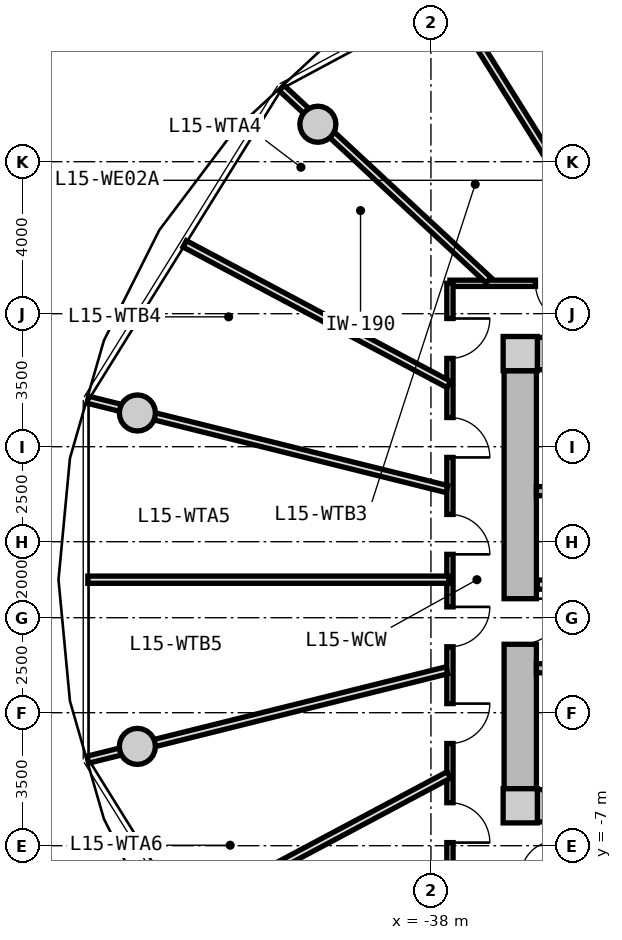
"""IFC4 building model, lengths in metres.
Left out: names, types, materials, properties, quantities, classifications, styles, units other than length and angle.
Written with IfcOpenShell. Run it as: python <this file> out.ifc"""

import sys

from ifc_helpers import new_model, si_unit, direction, frame, frame_2d, origin, origin_2d, place, context, subcontext, project, spatial, rectangle, circle, extrude, source, transform, mapped, element, fill, save


model = new_model("IFC4")
c1 = context("Model", 3, precision=1e-05, world=origin(), true_north=direction((0.0, 1.0)))
c2 = subcontext(c1, "Body", "Model", "MODEL_VIEW")
j1 = project(units=[si_unit("LENGTHUNIT", "METRE"), si_unit("PLANEANGLEUNIT", "RADIAN")], contexts=[c1])
p1 = place(None, origin())
s1 = spatial("IfcSite", under=j1, at=p1, CompositionType="ELEMENT")
p2 = place(p1, origin())
s2 = spatial("IfcBuilding", under=s1, at=p2, CompositionType="ELEMENT")
p3 = place(p2, frame((0.0, 0.0, 52.1)))
s3 = spatial("IfcBuildingStorey", under=s2, at=p3, CompositionType="ELEMENT", Elevation=52.1)
m1 = source(origin(), c2, "Body", "SweptSolid", [
    extrude(rectangle(XDim=0.9, YDim=0.9, at=origin_2d()), origin(), (0.0, 0.0, 1.0), 3.05),
])
for number, where, z_axis, x_axis in (
    (1, (-35.65, -5.95, 0.0), (0.0, 0.0, 1.0), (1.0, 0.0, 0.0)),
    (2, (-35.65, 5.95, 0.0), (0.0, 0.0, 1.0), (1.0, 0.0, 0.0)),
):
    element("IfcColumn", number, at=place(p3, frame(where, z_axis=z_axis, x_axis=x_axis)), inside=s3, PredefinedType="COLUMN", context=c2, shape_type="MappedRepresentation", body=[
        mapped(m1, transform((0.0, 0.0, 0.0), x_axis=(1.0, 0.0, 0.0), y_axis=(0.0, 1.0, 0.0), z_axis=(0.0, 0.0, 1.0), scale=1.0)),
    ])
m2 = source(origin(), c2, "Body", "SweptSolid", [
    extrude(rectangle(XDim=14.4, YDim=0.85, at=frame_2d((7.2, 0.0))), origin(), (0.0, 0.0, 1.0), 2.79),
])
for number, where, z_axis, x_axis in (
    (3, (-35.2, 5.95, 0.0), (0.0, 0.0, 1.0), (1.0, 0.0, 0.0)),
    (4, (-20.8, -5.95, 0.0), (0.0, 0.0, 1.0), (-1.0, 0.0, 0.0)),
):
    element("IfcWall", number, at=place(p3, frame(where, z_axis=z_axis, x_axis=x_axis)), inside=s3, PredefinedType="SHEAR", context=c2, shape_type="MappedRepresentation", body=[
        mapped(m2, transform((0.0, 0.0, 0.0), x_axis=(1.0, 0.0, 0.0), y_axis=(0.0, 1.0, 0.0), z_axis=(0.0, 0.0, 1.0), scale=1.0)),
    ])
m3 = source(origin(), c2, "Body", "SweptSolid", [
    extrude(rectangle(XDim=11.0, YDim=0.85, at=frame_2d((5.5, 0.0))), origin(), (0.0, 0.0, 1.0), 2.79),
])
p4 = place(p3, frame((-35.65, -5.5, 0.0), z_axis=(0.0, 0.0, 1.0), x_axis=(0.0, 1.0, 0.0)))
e5 = element("IfcWall", 5, at=p4, inside=s3, PredefinedType="SHEAR", context=c2, shape_type="MappedRepresentation", body=[
    mapped(m3, transform((0.0, 0.0, 0.0), x_axis=(1.0, 0.0, 0.0), y_axis=(0.0, 1.0, 0.0), z_axis=(0.0, 0.0, 1.0), scale=1.0)),
])
p5 = place(p4, frame((3.8, 0.0, 0.0)))
e6 = element("IfcOpeningElement", 6, at=p5, cuts=e5, PredefinedType="OPENING", context=c2, shape_type="SweptSolid", body=[
    extrude(rectangle(XDim=1.2, YDim=2.15, at=frame_2d((0.6, 1.075))), frame((0.0, 0.435, 0.0), z_axis=(0.0, -1.0, 0.0), x_axis=(1.0, 0.0, 0.0)), (0.0, 0.0, 1.0), 0.87),
])
m4 = source(origin(), c2, "Body", "SweptSolid", [
    extrude(circle(Radius=0.475, at=origin_2d()), origin(), (0.0, 0.0, 1.0), 3.05),
])
for number, where, z_axis, x_axis in (
    (7, (-40.975, 11.985, 0.0), (0.0, 0.0, 1.0), (1.0, 0.0, 0.0)),
    (8, (-45.725, 4.387, 0.0), (0.0, 0.0, 1.0), (1.0, 0.0, 0.0)),
    (9, (-45.725, -4.387, 0.0), (0.0, 0.0, 1.0), (1.0, 0.0, 0.0)),
):
    element("IfcColumn", number, at=place(p3, frame(where, z_axis=z_axis, x_axis=x_axis)), inside=s3, PredefinedType="COLUMN", context=c2, shape_type="MappedRepresentation", body=[
        mapped(m4, transform((0.0, 0.0, 0.0), x_axis=(1.0, 0.0, 0.0), y_axis=(0.0, 1.0, 0.0), z_axis=(0.0, 0.0, 1.0), scale=1.0)),
    ])
m5 = source(origin(), c2, "Body", "SweptSolid", [
    extrude(rectangle(XDim=7.765, YDim=0.24, at=frame_2d((3.883, 0.0))), origin(), (0.0, 0.0, 1.0), 2.79),
])
p6 = place(p3, frame((-35.225, 2.33, 0.0), z_axis=(0.0, 0.0, 1.0), x_axis=(1.0, 0.0, 0.0)))
e10 = element("IfcWall", 10, at=p6, inside=s3, PredefinedType="PARTITIONING", context=c2, shape_type="MappedRepresentation", body=[
    mapped(m5, transform((0.0, 0.0, 0.0), x_axis=(1.0, 0.0, 0.0), y_axis=(0.0, 1.0, 0.0), z_axis=(0.0, 0.0, 1.0), scale=1.0)),
])
p7 = place(p3, frame((-35.225, -2.33, 0.0), z_axis=(0.0, 0.0, 1.0), x_axis=(1.0, 0.0, 0.0)))
e11 = element("IfcWall", 11, at=p7, inside=s3, PredefinedType="PARTITIONING", context=c2, shape_type="MappedRepresentation", body=[
    mapped(m5, transform((0.0, 0.0, 0.0), x_axis=(1.0, 0.0, 0.0), y_axis=(0.0, 1.0, 0.0), z_axis=(0.0, 0.0, 1.0), scale=1.0)),
])
p8 = place(p7, frame((0.885, 0.0, 0.0)))
e12 = element("IfcOpeningElement", 12, at=p8, cuts=e11, PredefinedType="OPENING", context=c2, shape_type="SweptSolid", body=[
    extrude(rectangle(XDim=1.1, YDim=2.15, at=frame_2d((0.55, 1.075))), frame((0.0, 0.13, 0.0), z_axis=(0.0, -1.0, 0.0), x_axis=(1.0, 0.0, 0.0)), (0.0, 0.0, 1.0), 0.26),
])
m6 = source(origin(), c2, "Body", "SweptSolid", [
    extrude(rectangle(XDim=7.62, YDim=0.24, at=frame_2d((3.81, 0.0))), origin(), (0.0, 0.0, 1.0), 2.775),
])
p9 = place(p3, frame((-35.2, -0.13, 0.0), z_axis=(0.0, 0.0, 1.0), x_axis=(1.0, 0.0, 0.0)))
e13 = element("IfcWall", 13, at=p9, inside=s3, PredefinedType="PARTITIONING", context=c2, shape_type="MappedRepresentation", body=[
    mapped(m6, transform((0.0, 0.0, 0.0), x_axis=(1.0, 0.0, 0.0), y_axis=(0.0, 1.0, 0.0), z_axis=(0.0, 0.0, 1.0), scale=1.0)),
])
p10 = place(p9, frame((6.22, 0.0, 0.0)))
e14 = element("IfcOpeningElement", 14, at=p10, cuts=e13, PredefinedType="OPENING", context=c2, shape_type="SweptSolid", body=[
    extrude(rectangle(XDim=1.0, YDim=2.1, at=frame_2d((0.5, 1.05))), frame((0.0, 0.13, 0.0), z_axis=(0.0, -1.0, 0.0), x_axis=(1.0, 0.0, 0.0)), (0.0, 0.0, 1.0), 0.26),
])
p11 = place(p9, frame((0.85, 0.0, 0.0)))
e15 = element("IfcOpeningElement", 15, at=p11, cuts=e13, PredefinedType="OPENING", context=c2, shape_type="SweptSolid", body=[
    extrude(rectangle(XDim=1.1, YDim=2.2, at=frame_2d((0.55, 1.1))), frame((0.0, 0.13, 0.0), z_axis=(0.0, -1.0, 0.0), x_axis=(1.0, 0.0, 0.0)), (0.0, 0.0, 1.0), 0.26),
])
p12 = place(p9, frame((3.85, 0.0, 0.0)))
e16 = element("IfcOpeningElement", 16, at=p12, cuts=e13, PredefinedType="OPENING", context=c2, shape_type="SweptSolid", body=[
    extrude(rectangle(XDim=1.1, YDim=2.2, at=frame_2d((0.55, 1.1))), frame((0.0, 0.13, 0.0), z_axis=(0.0, -1.0, 0.0), x_axis=(1.0, 0.0, 0.0)), (0.0, 0.0, 1.0), 0.26),
])
m7 = source(origin(), c2, "Body", "SweptSolid", [
    extrude(rectangle(XDim=19.0, YDim=0.165, at=frame_2d((9.5, 0.0))), origin(), (0.0, 0.0, 1.0), 2.775),
])
p13 = place(p3, frame((-37.5, 7.8, 0.0), z_axis=(0.0, 0.0, 1.0), x_axis=(1.0, 0.0, 0.0)))
e17 = element("IfcWall", 17, at=p13, inside=s3, PredefinedType="PARTITIONING", context=c2, shape_type="MappedRepresentation", body=[
    mapped(m7, transform((0.0, 0.0, 0.0), x_axis=(1.0, 0.0, 0.0), y_axis=(0.0, 1.0, 0.0), z_axis=(0.0, 0.0, 1.0), scale=1.0)),
])
p14 = place(p13, frame((14.653, 0.0, 0.0)))
e18 = element("IfcOpeningElement", 18, at=p14, cuts=e17, PredefinedType="OPENING", context=c2, shape_type="SweptSolid", body=[
    extrude(rectangle(XDim=1.05, YDim=2.15, at=frame_2d((0.525, 1.075))), frame((0.0, 0.093, 0.0), z_axis=(0.0, -1.0, 0.0), x_axis=(1.0, 0.0, 0.0)), (0.0, 0.0, 1.0), 0.185),
])
p15 = place(p13, frame((12.5, 0.0, 0.0)))
e19 = element("IfcOpeningElement", 19, at=p15, cuts=e17, PredefinedType="OPENING", context=c2, shape_type="SweptSolid", body=[
    extrude(rectangle(XDim=1.05, YDim=2.15, at=frame_2d((0.525, 1.075))), frame((0.0, 0.093, 0.0), z_axis=(0.0, -1.0, 0.0), x_axis=(1.0, 0.0, 0.0)), (0.0, 0.0, 1.0), 0.185),
])
p16 = place(p13, frame((9.352, 0.0, 0.0)))
e20 = element("IfcOpeningElement", 20, at=p16, cuts=e17, PredefinedType="OPENING", context=c2, shape_type="SweptSolid", body=[
    extrude(rectangle(XDim=1.05, YDim=2.15, at=frame_2d((0.525, 1.075))), frame((0.0, 0.093, 0.0), z_axis=(0.0, -1.0, 0.0), x_axis=(1.0, 0.0, 0.0)), (0.0, 0.0, 1.0), 0.185),
])
p17 = place(p13, frame((7.806, 0.0, 0.0)))
e21 = element("IfcOpeningElement", 21, at=p17, cuts=e17, PredefinedType="OPENING", context=c2, shape_type="SweptSolid", body=[
    extrude(rectangle(XDim=1.05, YDim=2.15, at=frame_2d((0.525, 1.075))), frame((0.0, 0.093, 0.0), z_axis=(0.0, -1.0, 0.0), x_axis=(1.0, 0.0, 0.0)), (0.0, 0.0, 1.0), 0.185),
])
p18 = place(p13, frame((5.396, 0.0, 0.0)))
e22 = element("IfcOpeningElement", 22, at=p18, cuts=e17, PredefinedType="OPENING", context=c2, shape_type="SweptSolid", body=[
    extrude(rectangle(XDim=1.05, YDim=2.15, at=frame_2d((0.525, 1.075))), frame((0.0, 0.093, 0.0), z_axis=(0.0, -1.0, 0.0), x_axis=(1.0, 0.0, 0.0)), (0.0, 0.0, 1.0), 0.185),
])
p19 = place(p13, frame((2.251, 0.0, 0.0)))
e23 = element("IfcOpeningElement", 23, at=p19, cuts=e17, PredefinedType="OPENING", context=c2, shape_type="SweptSolid", body=[
    extrude(rectangle(XDim=1.05, YDim=2.15, at=frame_2d((0.525, 1.075))), frame((0.0, 0.093, 0.0), z_axis=(0.0, -1.0, 0.0), x_axis=(1.0, 0.0, 0.0)), (0.0, 0.0, 1.0), 0.185),
])
m8 = source(origin(), c2, "Body", "SweptSolid", [
    extrude(rectangle(XDim=15.6, YDim=0.165, at=frame_2d((7.8, 0.0))), origin(), (0.0, 0.0, 1.0), 2.775),
])
p20 = place(p3, frame((-37.5, -7.8, 0.0), z_axis=(0.0, 0.0, 1.0), x_axis=(0.0, 1.0, 0.0)))
e24 = element("IfcWall", 24, at=p20, inside=s3, PredefinedType="PARTITIONING", context=c2, shape_type="MappedRepresentation", body=[
    mapped(m8, transform((0.0, 0.0, 0.0), x_axis=(1.0, 0.0, 0.0), y_axis=(0.0, 1.0, 0.0), z_axis=(0.0, 0.0, 1.0), scale=1.0)),
])
p21 = place(p20, frame((13.623, 0.0, 0.0)))
e25 = element("IfcOpeningElement", 25, at=p21, cuts=e24, PredefinedType="OPENING", context=c2, shape_type="SweptSolid", body=[
    extrude(rectangle(XDim=1.05, YDim=2.15, at=frame_2d((0.525, 1.075))), frame((0.0, 0.093, 0.0), z_axis=(0.0, -1.0, 0.0), x_axis=(1.0, 0.0, 0.0)), (0.0, 0.0, 1.0), 0.185),
])
p22 = place(p20, frame((11.018, 0.0, 0.0)))
e26 = element("IfcOpeningElement", 26, at=p22, cuts=e24, PredefinedType="OPENING", context=c2, shape_type="SweptSolid", body=[
    extrude(rectangle(XDim=1.05, YDim=2.15, at=frame_2d((0.525, 1.075))), frame((0.0, 0.093, 0.0), z_axis=(0.0, -1.0, 0.0), x_axis=(1.0, 0.0, 0.0)), (0.0, 0.0, 1.0), 0.185),
])
p23 = place(p20, frame((8.467, 0.0, 0.0)))
e27 = element("IfcOpeningElement", 27, at=p23, cuts=e24, PredefinedType="OPENING", context=c2, shape_type="SweptSolid", body=[
    extrude(rectangle(XDim=1.05, YDim=2.15, at=frame_2d((0.525, 1.075))), frame((0.0, 0.093, 0.0), z_axis=(0.0, -1.0, 0.0), x_axis=(1.0, 0.0, 0.0)), (0.0, 0.0, 1.0), 0.185),
])
p24 = place(p20, frame((6.035, 0.0, 0.0)))
e28 = element("IfcOpeningElement", 28, at=p24, cuts=e24, PredefinedType="OPENING", context=c2, shape_type="SweptSolid", body=[
    extrude(rectangle(XDim=1.05, YDim=2.15, at=frame_2d((0.525, 1.075))), frame((0.0, 0.093, 0.0), z_axis=(0.0, -1.0, 0.0), x_axis=(1.0, 0.0, 0.0)), (0.0, 0.0, 1.0), 0.185),
])
p25 = place(p20, frame((3.489, 0.0, 0.0)))
e29 = element("IfcOpeningElement", 29, at=p25, cuts=e24, PredefinedType="OPENING", context=c2, shape_type="SweptSolid", body=[
    extrude(rectangle(XDim=1.05, YDim=2.15, at=frame_2d((0.525, 1.075))), frame((0.0, 0.093, 0.0), z_axis=(0.0, -1.0, 0.0), x_axis=(1.0, 0.0, 0.0)), (0.0, 0.0, 1.0), 0.185),
])
p26 = place(p20, frame((0.882, 0.0, 0.0)))
e30 = element("IfcOpeningElement", 30, at=p26, cuts=e24, PredefinedType="OPENING", context=c2, shape_type="SweptSolid", body=[
    extrude(rectangle(XDim=1.05, YDim=2.15, at=frame_2d((0.525, 1.075))), frame((0.0, 0.093, 0.0), z_axis=(0.0, -1.0, 0.0), x_axis=(1.0, 0.0, 0.0)), (0.0, 0.0, 1.0), 0.185),
])
m9 = source(origin(), c2, "Body", "SweptSolid", [
    extrude(rectangle(XDim=7.435, YDim=0.19, at=frame_2d((3.717, 0.0))), origin(), (0.0, 0.0, 1.0), 2.225),
])
p27 = place(p3, frame((-36.483, 7.88, 0.0), z_axis=(0.0, 0.0, 1.0), x_axis=(-0.732651956848, 0.680603489652, 0.0)))
e31 = element("IfcWall", 31, at=p27, inside=s3, PredefinedType="PARTITIONING", context=c2, shape_type="MappedRepresentation", body=[
    mapped(m9, transform((0.0, 0.0, 0.0), x_axis=(1.0, 0.0, 0.0), y_axis=(0.0, 1.0, 0.0), z_axis=(0.0, 0.0, 1.0), scale=1.0)),
])
m10 = source(origin(), c2, "Body", "SweptSolid", [
    extrude(rectangle(XDim=9.737, YDim=0.19, at=frame_2d((4.869, 0.0))), origin(), (0.0, 0.0, 1.0), 2.225),
])
p28 = place(p3, frame((-37.58, 2.385, 0.0), z_axis=(0.0, 0.0, 1.0), x_axis=(-0.970392716238, 0.241532557375, 0.0)))
e32 = element("IfcWall", 32, at=p28, inside=s3, PredefinedType="PARTITIONING", context=c2, shape_type="MappedRepresentation", body=[
    mapped(m10, transform((0.0, 0.0, 0.0), x_axis=(1.0, 0.0, 0.0), y_axis=(0.0, 1.0, 0.0), z_axis=(0.0, 0.0, 1.0), scale=1.0)),
])
m11 = source(origin(), c2, "Body", "SweptSolid", [
    extrude(rectangle(XDim=7.873, YDim=0.19, at=frame_2d((3.937, 0.0))), origin(), (0.0, 0.0, 1.0), 2.775),
])
p29 = place(p3, frame((-37.53, 5.138, 0.0), z_axis=(0.0, 0.0, 1.0), x_axis=(-0.882666052726, 0.470000680175, 0.0)))
e33 = element("IfcWall", 33, at=p29, inside=s3, PredefinedType="PARTITIONING", context=c2, shape_type="MappedRepresentation", body=[
    mapped(m11, transform((0.0, 0.0, 0.0), x_axis=(1.0, 0.0, 0.0), y_axis=(0.0, 1.0, 0.0), z_axis=(0.0, 0.0, 1.0), scale=1.0)),
])
p30 = place(p3, frame((-37.58, -2.385, 0.0), z_axis=(0.0, 0.0, 1.0), x_axis=(-0.970392716238, -0.241532557375, 0.0)))
e34 = element("IfcWall", 34, at=p30, inside=s3, PredefinedType="PARTITIONING", context=c2, shape_type="MappedRepresentation", body=[
    mapped(m10, transform((0.0, 0.0, 0.0), x_axis=(1.0, 0.0, 0.0), y_axis=(0.0, 1.0, 0.0), z_axis=(0.0, 0.0, 1.0), scale=1.0)),
])
m12 = source(origin(), c2, "Body", "SweptSolid", [
    extrude(rectangle(XDim=9.499, YDim=0.19, at=frame_2d((4.75, 0.0))), origin(), (0.0, 0.0, 1.0), 2.775),
])
p31 = place(p3, frame((-37.53, 0.0, 0.0), z_axis=(0.0, 0.0, 1.0), x_axis=(-1.0, 0.0, 0.0)))
e35 = element("IfcWall", 35, at=p31, inside=s3, PredefinedType="PARTITIONING", context=c2, shape_type="MappedRepresentation", body=[
    mapped(m12, transform((0.0, 0.0, 0.0), x_axis=(1.0, 0.0, 0.0), y_axis=(0.0, 1.0, 0.0), z_axis=(0.0, 0.0, 1.0), scale=1.0)),
])
p32 = place(p3, frame((-37.53, -5.138, 0.0), z_axis=(0.0, 0.0, 1.0), x_axis=(-0.882666052726, -0.470000680175, 0.0)))
e36 = element("IfcWall", 36, at=p32, inside=s3, PredefinedType="PARTITIONING", context=c2, shape_type="MappedRepresentation", body=[
    mapped(m11, transform((0.0, 0.0, 0.0), x_axis=(1.0, 0.0, 0.0), y_axis=(0.0, 1.0, 0.0), z_axis=(0.0, 0.0, 1.0), scale=1.0)),
])
m13 = source(origin(), c2, "Body", "SweptSolid", [
    extrude(rectangle(XDim=8.818, YDim=0.19, at=frame_2d((4.409, 0.0))), origin(), (0.0, 0.0, 1.0), 2.775),
])
p33 = place(p3, frame((-32.841, 7.83, 0.0), z_axis=(0.0, 0.0, 1.0), x_axis=(-0.529931746109, 0.848040296487, 0.0)))
e37 = element("IfcWall", 37, at=p33, inside=s3, PredefinedType="PARTITIONING", context=c2, shape_type="MappedRepresentation", body=[
    mapped(m13, transform((0.0, 0.0, 0.0), x_axis=(1.0, 0.0, 0.0), y_axis=(0.0, 1.0, 0.0), z_axis=(0.0, 0.0, 1.0), scale=1.0)),
])
m14 = source(origin(), c2, "Body", "SweptSolid", [
    extrude(rectangle(XDim=1.2, YDim=2.15, at=frame_2d((0.6, 1.075))), frame((0.0, 0.025, 0.0), z_axis=(0.0, -1.0, 0.0), x_axis=(1.0, 0.0, 0.0)), (0.0, 0.0, 1.0), 0.05),
])
p34 = place(p5, frame((1.2, 0.0, 0.0), z_axis=(0.0, 0.0, 1.0), x_axis=(-1.0, 0.0, 0.0)))
e38 = element("IfcDoor", 38, at=p34, inside=s3, OperationType="SINGLE_SWING_LEFT", PredefinedType="DOOR", context=c2, shape_type="MappedRepresentation", body=[
    mapped(m14, transform((0.0, 0.0, 0.0), x_axis=(1.0, 0.0, 0.0), y_axis=(0.0, 1.0, 0.0), z_axis=(0.0, 0.0, 1.0), scale=1.0)),
])
fill(e6, e38)
m15 = source(origin(), c2, "Body", "SweptSolid", [
    extrude(rectangle(XDim=1.05, YDim=2.15, at=frame_2d((0.525, 1.075))), frame((0.0, 0.025, 0.0), z_axis=(0.0, -1.0, 0.0), x_axis=(1.0, 0.0, 0.0)), (0.0, 0.0, 1.0), 0.05),
])
p35 = place(p21, frame((1.05, 0.0, 0.0), z_axis=(0.0, 0.0, 1.0), x_axis=(-1.0, 0.0, 0.0)))
e39 = element("IfcDoor", 39, at=p35, inside=s3, OperationType="SINGLE_SWING_LEFT", PredefinedType="DOOR", context=c2, shape_type="MappedRepresentation", body=[
    mapped(m15, transform((0.0, 0.0, 0.0), x_axis=(1.0, 0.0, 0.0), y_axis=(0.0, 1.0, 0.0), z_axis=(0.0, 0.0, 1.0), scale=1.0)),
])
fill(e25, e39)
p36 = place(p22, frame((1.05, 0.0, 0.0), z_axis=(0.0, 0.0, 1.0), x_axis=(-1.0, 0.0, 0.0)))
e40 = element("IfcDoor", 40, at=p36, inside=s3, OperationType="SINGLE_SWING_RIGHT", PredefinedType="DOOR", context=c2, shape_type="MappedRepresentation", body=[
    mapped(m15, transform((0.0, 0.0, 0.0), x_axis=(1.0, 0.0, 0.0), y_axis=(0.0, 1.0, 0.0), z_axis=(0.0, 0.0, 1.0), scale=1.0)),
])
fill(e26, e40)
p37 = place(p23, frame((1.05, 0.0, 0.0), z_axis=(0.0, 0.0, 1.0), x_axis=(-1.0, 0.0, 0.0)))
e41 = element("IfcDoor", 41, at=p37, inside=s3, OperationType="SINGLE_SWING_RIGHT", PredefinedType="DOOR", context=c2, shape_type="MappedRepresentation", body=[
    mapped(m15, transform((0.0, 0.0, 0.0), x_axis=(1.0, 0.0, 0.0), y_axis=(0.0, 1.0, 0.0), z_axis=(0.0, 0.0, 1.0), scale=1.0)),
])
fill(e27, e41)
p38 = place(p24, frame((1.05, 0.0, 0.0), z_axis=(0.0, 0.0, 1.0), x_axis=(-1.0, 0.0, 0.0)))
e42 = element("IfcDoor", 42, at=p38, inside=s3, OperationType="SINGLE_SWING_LEFT", PredefinedType="DOOR", context=c2, shape_type="MappedRepresentation", body=[
    mapped(m15, transform((0.0, 0.0, 0.0), x_axis=(1.0, 0.0, 0.0), y_axis=(0.0, 1.0, 0.0), z_axis=(0.0, 0.0, 1.0), scale=1.0)),
])
fill(e28, e42)
p39 = place(p25, frame((1.05, 0.0, 0.0), z_axis=(0.0, 0.0, 1.0), x_axis=(-1.0, 0.0, 0.0)))
e43 = element("IfcDoor", 43, at=p39, inside=s3, OperationType="SINGLE_SWING_LEFT", PredefinedType="DOOR", context=c2, shape_type="MappedRepresentation", body=[
    mapped(m15, transform((0.0, 0.0, 0.0), x_axis=(1.0, 0.0, 0.0), y_axis=(0.0, 1.0, 0.0), z_axis=(0.0, 0.0, 1.0), scale=1.0)),
])
fill(e29, e43)
p40 = place(p26, frame((1.05, 0.0, 0.0), z_axis=(0.0, 0.0, 1.0), x_axis=(-1.0, 0.0, 0.0)))
e44 = element("IfcDoor", 44, at=p40, inside=s3, OperationType="SINGLE_SWING_RIGHT", PredefinedType="DOOR", context=c2, shape_type="MappedRepresentation", body=[
    mapped(m15, transform((0.0, 0.0, 0.0), x_axis=(1.0, 0.0, 0.0), y_axis=(0.0, 1.0, 0.0), z_axis=(0.0, 0.0, 1.0), scale=1.0)),
])
fill(e30, e44)
p41 = place(p19, frame((1.05, 0.0, 0.0), z_axis=(0.0, 0.0, 1.0), x_axis=(-1.0, 0.0, 0.0)))
e45 = element("IfcDoor", 45, at=p41, inside=s3, OperationType="SINGLE_SWING_LEFT", PredefinedType="DOOR", context=c2, shape_type="MappedRepresentation", body=[
    mapped(m15, transform((0.0, 0.0, 0.0), x_axis=(1.0, 0.0, 0.0), y_axis=(0.0, 1.0, 0.0), z_axis=(0.0, 0.0, 1.0), scale=1.0)),
])
fill(e23, e45)
save(model, sys.argv[1])
